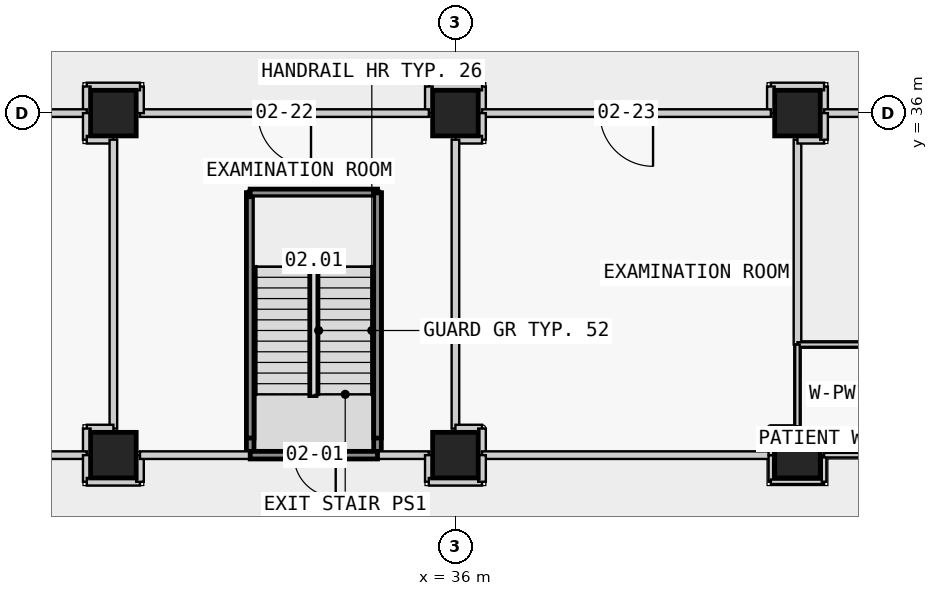
"""IFC4 building model, lengths in metres.
Left out: names, types, materials, properties, quantities, classifications, styles, units other than length and angle.
Written with IfcOpenShell. Run it as: python <this file> out.ifc"""

import sys

from ifc_helpers import new_model, si_unit, direction, frame, frame_2d, origin, origin_2d, place, context, subcontext, project, spatial, rectangle, extrude, element, fill, save


model = new_model("IFC4")
c1 = context("Model", 3, precision=1e-05, world=origin(), true_north=direction((0.0, 1.0)))
c2 = subcontext(c1, "Body", "Model", "MODEL_VIEW")
j1 = project(units=[si_unit("LENGTHUNIT", "METRE"), si_unit("PLANEANGLEUNIT", "RADIAN")], contexts=[c1])
p1 = place(None, origin())
s1 = spatial("IfcSite", under=j1, at=p1, CompositionType="ELEMENT")
p2 = place(p1, origin())
s2 = spatial("IfcBuilding", under=s1, at=p2, CompositionType="ELEMENT")
p3 = place(p2, frame((0.0, 0.0, 12.8)))
s3 = spatial("IfcBuildingStorey", under=s2, at=p3, CompositionType="ELEMENT", Elevation=12.8)
for number, where, z_axis, x_axis in (
    (1, (27.0, 27.0, 0.0), (0.0, 0.0, 1.0), (1.0, 0.0, 0.0)),
    (2, (27.0, 36.0, 0.0), (0.0, 0.0, 1.0), (1.0, 0.0, 0.0)),
    (3, (36.0, 27.0, 0.0), (0.0, 0.0, 1.0), (1.0, 0.0, 0.0)),
    (4, (36.0, 36.0, 0.0), (0.0, 0.0, 1.0), (1.0, 0.0, 0.0)),
    (5, (45.0, 27.0, 0.0), (0.0, 0.0, 1.0), (1.0, 0.0, 0.0)),
    (6, (45.0, 36.0, 0.0), (0.0, 0.0, 1.0), (1.0, 0.0, 0.0)),
):
    element("IfcColumn", number, at=place(p3, frame(where, z_axis=z_axis, x_axis=x_axis)), inside=s3, PredefinedType="COLUMN", context=c2, shape_type="SweptSolid", body=[
        extrude(rectangle(XDim=1.2, YDim=1.2, at=origin_2d()), origin(), (0.0, 0.0, 1.0), 4.5),
    ])
p4 = place(p3, frame((30.6, 27.0, 0.0), z_axis=(0.0, 0.0, 1.0), x_axis=(0.0, 1.0, 0.0)))
e7 = element("IfcWall", 7, at=p4, inside=s3, PredefinedType="PARTITIONING", context=c2, shape_type="SweptSolid", body=[
    extrude(rectangle(XDim=6.9, YDim=0.2, at=frame_2d((3.45, 0.0))), origin(), (0.0, 0.0, 1.0), 3.45),
])
p5 = place(p3, frame((30.6, 33.9, 0.0), z_axis=(0.0, 0.0, 1.0), x_axis=(1.0, 0.0, 0.0)))
e8 = element("IfcWall", 8, at=p5, inside=s3, PredefinedType="PARTITIONING", context=c2, shape_type="SweptSolid", body=[
    extrude(rectangle(XDim=3.35, YDim=0.2, at=frame_2d((1.675, 0.0))), origin(), (0.0, 0.0, 1.0), 4.15),
])
p6 = place(p3, frame((33.95, 33.9, 0.0), z_axis=(0.0, 0.0, 1.0), x_axis=(0.0, -1.0, 0.0)))
e9 = element("IfcWall", 9, at=p6, inside=s3, PredefinedType="PARTITIONING", context=c2, shape_type="SweptSolid", body=[
    extrude(rectangle(XDim=6.9, YDim=0.2, at=frame_2d((3.45, 0.0))), origin(), (0.0, 0.0, 1.0), 3.45),
])
p7 = place(p3, frame((36.7, 36.0, 0.0), z_axis=(0.0, 0.0, 1.0), x_axis=(0.0, 1.0, 0.0)))
e10 = element("IfcWall", 10, at=p7, inside=s3, PredefinedType="PARTITIONING", context=c2, shape_type="SweptSolid", body=[
    extrude(rectangle(XDim=0.7, YDim=0.2, at=frame_2d((0.35, 0.0))), origin(), (0.0, 0.0, 1.0), 3.45),
])
p8 = place(p3, frame((36.7, 36.7, 0.0), z_axis=(0.0, 0.0, 1.0), x_axis=(-1.0, 0.0, 0.0)))
e11 = element("IfcWall", 11, at=p8, inside=s3, PredefinedType="PARTITIONING", context=c2, shape_type="SweptSolid", body=[
    extrude(rectangle(XDim=1.4, YDim=0.2, at=frame_2d((0.7, 0.0))), origin(), (0.0, 0.0, 1.0), 3.45),
])
p9 = place(p3, frame((35.3, 36.7, 0.0), z_axis=(0.0, 0.0, 1.0), x_axis=(0.0, -1.0, 0.0)))
e12 = element("IfcWall", 12, at=p9, inside=s3, PredefinedType="PARTITIONING", context=c2, shape_type="SweptSolid", body=[
    extrude(rectangle(XDim=0.7, YDim=0.2, at=frame_2d((0.35, 0.0))), origin(), (0.0, 0.0, 1.0), 3.45),
])
p10 = place(p3, frame((35.3, 36.0, 0.0), z_axis=(0.0, 0.0, 1.0), x_axis=(-1.0, 0.0, 0.0)))
e13 = element("IfcWall", 13, at=p10, inside=s3, PredefinedType="PARTITIONING", context=c2, shape_type="SweptSolid", body=[
    extrude(rectangle(XDim=7.6, YDim=0.2, at=frame_2d((3.8, 0.0))), origin(), (0.0, 0.0, 1.0), 3.45),
])
p11 = place(p10, frame((3.1, 0.0, 0.0)))
e14 = element("IfcOpeningElement", 14, at=p11, cuts=e13, PredefinedType="OPENING", context=c2, shape_type="SweptSolid", body=[
    extrude(rectangle(XDim=1.4, YDim=2.1, at=frame_2d((0.7, 1.05))), frame((0.0, 0.11, 0.0), z_axis=(0.0, -1.0, 0.0), x_axis=(1.0, 0.0, 0.0)), (0.0, 0.0, 1.0), 0.22),
])
p12 = place(p3, frame((27.7, 36.0, 0.0), z_axis=(0.0, 0.0, 1.0), x_axis=(0.0, 1.0, 0.0)))
e15 = element("IfcWall", 15, at=p12, inside=s3, PredefinedType="PARTITIONING", context=c2, shape_type="SweptSolid", body=[
    extrude(rectangle(XDim=0.7, YDim=0.2, at=frame_2d((0.35, 0.0))), origin(), (0.0, 0.0, 1.0), 3.45),
])
p13 = place(p3, frame((27.7, 36.7, 0.0), z_axis=(0.0, 0.0, 1.0), x_axis=(-1.0, 0.0, 0.0)))
e16 = element("IfcWall", 16, at=p13, inside=s3, PredefinedType="PARTITIONING", context=c2, shape_type="SweptSolid", body=[
    extrude(rectangle(XDim=1.4, YDim=0.2, at=frame_2d((0.7, 0.0))), origin(), (0.0, 0.0, 1.0), 3.45),
])
p14 = place(p3, frame((26.3, 36.7, 0.0), z_axis=(0.0, 0.0, 1.0), x_axis=(0.0, -1.0, 0.0)))
e17 = element("IfcWall", 17, at=p14, inside=s3, PredefinedType="PARTITIONING", context=c2, shape_type="SweptSolid", body=[
    extrude(rectangle(XDim=0.7, YDim=0.2, at=frame_2d((0.35, 0.0))), origin(), (0.0, 0.0, 1.0), 3.45),
])
p15 = place(p3, frame((26.3, 36.0, 0.0), z_axis=(0.0, 0.0, 1.0), x_axis=(-1.0, 0.0, 0.0)))
e18 = element("IfcWall", 18, at=p15, inside=s3, PredefinedType="PARTITIONING", context=c2, shape_type="SweptSolid", body=[
    extrude(rectangle(XDim=7.3, YDim=0.2, at=frame_2d((3.65, 0.0))), origin(), (0.0, 0.0, 1.0), 3.45),
])
p16 = place(p15, frame((2.85, 0.0, 0.0)))
e19 = element("IfcOpeningElement", 19, at=p16, cuts=e18, PredefinedType="OPENING", context=c2, shape_type="SweptSolid", body=[
    extrude(rectangle(XDim=1.4, YDim=2.1, at=frame_2d((0.7, 1.05))), frame((0.0, 0.11, 0.0), z_axis=(0.0, -1.0, 0.0), x_axis=(1.0, 0.0, 0.0)), (0.0, 0.0, 1.0), 0.22),
])
p17 = place(p3, frame((45.7, 36.0, 0.0), z_axis=(0.0, 0.0, 1.0), x_axis=(0.0, 1.0, 0.0)))
e20 = element("IfcWall", 20, at=p17, inside=s3, PredefinedType="PARTITIONING", context=c2, shape_type="SweptSolid", body=[
    extrude(rectangle(XDim=0.7, YDim=0.2, at=frame_2d((0.35, 0.0))), origin(), (0.0, 0.0, 1.0), 3.45),
])
p18 = place(p3, frame((45.7, 36.7, 0.0), z_axis=(0.0, 0.0, 1.0), x_axis=(-1.0, 0.0, 0.0)))
e21 = element("IfcWall", 21, at=p18, inside=s3, PredefinedType="PARTITIONING", context=c2, shape_type="SweptSolid", body=[
    extrude(rectangle(XDim=1.4, YDim=0.2, at=frame_2d((0.7, 0.0))), origin(), (0.0, 0.0, 1.0), 3.45),
])
p19 = place(p3, frame((44.3, 36.7, 0.0), z_axis=(0.0, 0.0, 1.0), x_axis=(0.0, -1.0, 0.0)))
e22 = element("IfcWall", 22, at=p19, inside=s3, PredefinedType="PARTITIONING", context=c2, shape_type="SweptSolid", body=[
    extrude(rectangle(XDim=0.7, YDim=0.2, at=frame_2d((0.35, 0.0))), origin(), (0.0, 0.0, 1.0), 3.45),
])
p20 = place(p3, frame((44.3, 36.0, 0.0), z_axis=(0.0, 0.0, 1.0), x_axis=(-1.0, 0.0, 0.0)))
e23 = element("IfcWall", 23, at=p20, inside=s3, PredefinedType="PARTITIONING", context=c2, shape_type="SweptSolid", body=[
    extrude(rectangle(XDim=7.6, YDim=0.2, at=frame_2d((3.8, 0.0))), origin(), (0.0, 0.0, 1.0), 3.45),
])
p21 = place(p20, frame((3.1, 0.0, 0.0)))
e24 = element("IfcOpeningElement", 24, at=p21, cuts=e23, PredefinedType="OPENING", context=c2, shape_type="SweptSolid", body=[
    extrude(rectangle(XDim=1.4, YDim=2.1, at=frame_2d((0.7, 1.05))), frame((0.0, 0.11, 0.0), z_axis=(0.0, -1.0, 0.0), x_axis=(1.0, 0.0, 0.0)), (0.0, 0.0, 1.0), 0.22),
])
for number, where, z_axis, x_axis in (
    (25, (26.3, 36.0, 0.0), (0.0, 0.0, 1.0), (0.0, -1.0, 0.0)),
    (26, (26.3, 35.3, 0.0), (0.0, 0.0, 1.0), (1.0, 0.0, 0.0)),
):
    element("IfcWall", number, at=place(p3, frame(where, z_axis=z_axis, x_axis=x_axis)), inside=s3, PredefinedType="PARTITIONING", context=c2, shape_type="SweptSolid", body=[
        extrude(rectangle(XDim=0.7, YDim=0.2, at=frame_2d((0.35, 0.0))), origin(), (0.0, 0.0, 1.0), 3.45),
    ])
p22 = place(p3, frame((27.0, 35.3, 0.0), z_axis=(0.0, 0.0, 1.0), x_axis=(0.0, -1.0, 0.0)))
e27 = element("IfcWall", 27, at=p22, inside=s3, PredefinedType="PARTITIONING", context=c2, shape_type="SweptSolid", body=[
    extrude(rectangle(XDim=7.6, YDim=0.2, at=frame_2d((3.8, 0.0))), origin(), (0.0, 0.0, 1.0), 3.45),
])
for number, where, z_axis, x_axis in (
    (28, (27.0, 27.7, 0.0), (0.0, 0.0, 1.0), (-1.0, 0.0, 0.0)),
    (29, (26.3, 27.7, 0.0), (0.0, 0.0, 1.0), (0.0, -1.0, 0.0)),
    (30, (36.7, 36.0, 0.0), (0.0, 0.0, 1.0), (0.0, -1.0, 0.0)),
    (31, (36.7, 35.3, 0.0), (0.0, 0.0, 1.0), (-1.0, 0.0, 0.0)),
):
    element("IfcWall", number, at=place(p3, frame(where, z_axis=z_axis, x_axis=x_axis)), inside=s3, PredefinedType="PARTITIONING", context=c2, shape_type="SweptSolid", body=[
        extrude(rectangle(XDim=0.7, YDim=0.2, at=frame_2d((0.35, 0.0))), origin(), (0.0, 0.0, 1.0), 3.45),
    ])
p23 = place(p3, frame((36.0, 35.3, 0.0), z_axis=(0.0, 0.0, 1.0), x_axis=(0.0, -1.0, 0.0)))
e32 = element("IfcWall", 32, at=p23, inside=s3, PredefinedType="PARTITIONING", context=c2, shape_type="SweptSolid", body=[
    extrude(rectangle(XDim=7.6, YDim=0.2, at=frame_2d((3.8, 0.0))), origin(), (0.0, 0.0, 1.0), 3.45),
])
for number, where, z_axis, x_axis in (
    (33, (36.0, 27.7, 0.0), (0.0, 0.0, 1.0), (1.0, 0.0, 0.0)),
    (34, (36.7, 27.7, 0.0), (0.0, 0.0, 1.0), (0.0, -1.0, 0.0)),
):
    element("IfcWall", number, at=place(p3, frame(where, z_axis=z_axis, x_axis=x_axis)), inside=s3, PredefinedType="PARTITIONING", context=c2, shape_type="SweptSolid", body=[
        extrude(rectangle(XDim=0.7, YDim=0.2, at=frame_2d((0.35, 0.0))), origin(), (0.0, 0.0, 1.0), 3.45),
    ])
p24 = place(p3, frame((53.3, 36.0, 0.0), z_axis=(0.0, 0.0, 1.0), x_axis=(-1.0, 0.0, 0.0)))
e35 = element("IfcWall", 35, at=p24, inside=s3, PredefinedType="PARTITIONING", context=c2, shape_type="SweptSolid", body=[
    extrude(rectangle(XDim=7.6, YDim=0.2, at=frame_2d((3.8, 0.0))), origin(), (0.0, 0.0, 1.0), 3.45),
])
p25 = place(p24, frame((2.85, 0.0, 0.0)))
e36 = element("IfcOpeningElement", 36, at=p25, cuts=e35, PredefinedType="OPENING", context=c2, shape_type="SweptSolid", body=[
    extrude(rectangle(XDim=1.8, YDim=2.1, at=frame_2d((0.9, 1.05))), frame((0.0, 0.11, 0.0), z_axis=(0.0, -1.0, 0.0), x_axis=(1.0, 0.0, 0.0)), (0.0, 0.0, 1.0), 0.22),
])
p26 = place(p3, frame((18.8, 27.0, 0.0), z_axis=(0.0, 0.0, 1.0), x_axis=(1.0, 0.0, 0.0)))
e37 = element("IfcWall", 37, at=p26, inside=s3, PredefinedType="PARTITIONING", context=c2, shape_type="SweptSolid", body=[
    extrude(rectangle(XDim=7.5, YDim=0.2, at=frame_2d((3.75, 0.0))), origin(), (0.0, 0.0, 1.0), 3.45),
])
p27 = place(p3, frame((36.7, 27.0, 0.0), z_axis=(0.0, 0.0, 1.0), x_axis=(1.0, 0.0, 0.0)))
e38 = element("IfcWall", 38, at=p27, inside=s3, PredefinedType="PARTITIONING", context=c2, shape_type="SweptSolid", body=[
    extrude(rectangle(XDim=7.6, YDim=0.2, at=frame_2d((3.8, 0.0))), origin(), (0.0, 0.0, 1.0), 3.45),
])
p28 = place(p3, frame((45.0, 29.911, 0.0), z_axis=(0.0, 0.0, 1.0), x_axis=(0.0, 1.0, 0.0)))
e39 = element("IfcWall", 39, at=p28, inside=s3, PredefinedType="PARTITIONING", context=c2, shape_type="SweptSolid", body=[
    extrude(rectangle(XDim=5.389, YDim=0.2, at=frame_2d((2.695, 0.0))), origin(), (0.0, 0.0, 1.0), 3.45),
])
for number, where, z_axis, x_axis in (
    (40, (45.0, 35.3, 0.0), (0.0, 0.0, 1.0), (1.0, 0.0, 0.0)),
    (41, (45.7, 35.3, 0.0), (0.0, 0.0, 1.0), (0.0, 1.0, 0.0)),
):
    element("IfcWall", number, at=place(p3, frame(where, z_axis=z_axis, x_axis=x_axis)), inside=s3, PredefinedType="PARTITIONING", context=c2, shape_type="SweptSolid", body=[
        extrude(rectangle(XDim=0.7, YDim=0.2, at=frame_2d((0.35, 0.0))), origin(), (0.0, 0.0, 1.0), 3.45),
    ])
p29 = place(p3, frame((44.3, 27.0, 0.0), z_axis=(0.0, 0.0, 1.0), x_axis=(0.0, -1.0, 0.0)))
e42 = element("IfcWall", 42, at=p29, inside=s3, PredefinedType="PARTITIONING", context=c2, shape_type="SweptSolid", body=[
    extrude(rectangle(XDim=0.7, YDim=0.12, at=frame_2d((0.35, 0.0))), origin(), (0.0, 0.0, 1.0), 3.45),
])
p30 = place(p3, frame((44.3, 26.3, 0.0), z_axis=(0.0, 0.0, 1.0), x_axis=(1.0, 0.0, 0.0)))
e43 = element("IfcWall", 43, at=p30, inside=s3, PredefinedType="PARTITIONING", context=c2, shape_type="SweptSolid", body=[
    extrude(rectangle(XDim=1.4, YDim=0.12, at=frame_2d((0.7, 0.0))), origin(), (0.0, 0.0, 1.0), 3.45),
])
p31 = place(p3, frame((45.7, 26.3, 0.0), z_axis=(0.0, 0.0, 1.0), x_axis=(0.0, 1.0, 0.0)))
e44 = element("IfcWall", 44, at=p31, inside=s3, PredefinedType="PARTITIONING", context=c2, shape_type="SweptSolid", body=[
    extrude(rectangle(XDim=0.7, YDim=0.12, at=frame_2d((0.35, 0.0))), origin(), (0.0, 0.0, 1.0), 3.45),
])
p32 = place(p3, frame((45.7, 27.0, 0.0), z_axis=(0.0, 0.0, 1.0), x_axis=(1.0, 0.0, 0.0)))
e45 = element("IfcWall", 45, at=p32, inside=s3, PredefinedType="PARTITIONING", context=c2, shape_type="SweptSolid", body=[
    extrude(rectangle(XDim=3.8, YDim=0.12, at=frame_2d((1.9, 0.0))), origin(), (0.0, 0.0, 1.0), 3.45),
])
p33 = place(p3, frame((26.3, 27.0, 0.0), z_axis=(0.0, 0.0, 1.0), x_axis=(0.0, -1.0, 0.0)))
e46 = element("IfcWall", 46, at=p33, inside=s3, PredefinedType="PARTITIONING", context=c2, shape_type="SweptSolid", body=[
    extrude(rectangle(XDim=0.7, YDim=0.2, at=frame_2d((0.35, 0.0))), origin(), (0.0, 0.0, 1.0), 3.45),
])
p34 = place(p3, frame((26.3, 26.3, 0.0), z_axis=(0.0, 0.0, 1.0), x_axis=(1.0, 0.0, 0.0)))
e47 = element("IfcWall", 47, at=p34, inside=s3, PredefinedType="PARTITIONING", context=c2, shape_type="SweptSolid", body=[
    extrude(rectangle(XDim=1.4, YDim=0.2, at=frame_2d((0.7, 0.0))), origin(), (0.0, 0.0, 1.0), 3.45),
])
p35 = place(p3, frame((27.7, 26.3, 0.0), z_axis=(0.0, 0.0, 1.0), x_axis=(0.0, 1.0, 0.0)))
e48 = element("IfcWall", 48, at=p35, inside=s3, PredefinedType="PARTITIONING", context=c2, shape_type="SweptSolid", body=[
    extrude(rectangle(XDim=0.7, YDim=0.2, at=frame_2d((0.35, 0.0))), origin(), (0.0, 0.0, 1.0), 3.45),
])
p36 = place(p3, frame((27.7, 27.0, 0.0), z_axis=(0.0, 0.0, 1.0), x_axis=(1.0, 0.0, 0.0)))
e49 = element("IfcWall", 49, at=p36, inside=s3, PredefinedType="PARTITIONING", context=c2, shape_type="SweptSolid", body=[
    extrude(rectangle(XDim=2.9, YDim=0.2, at=frame_2d((1.45, 0.0))), origin(), (0.0, 0.0, 1.0), 3.45),
])
p37 = place(p3, frame((49.5, 29.911, 0.0), z_axis=(0.0, 0.0, 1.0), x_axis=(-1.0, 0.0, 0.0)))
e50 = element("IfcWall", 50, at=p37, inside=s3, PredefinedType="PARTITIONING", context=c2, shape_type="SweptSolid", body=[
    extrude(rectangle(XDim=4.5, YDim=0.12, at=frame_2d((2.25, 0.0))), origin(), (0.0, 0.0, 1.0), 3.45),
])
p38 = place(p3, frame((33.95, 27.0, 0.0), z_axis=(0.0, 0.0, 1.0), x_axis=(1.0, 0.0, 0.0)))
e51 = element("IfcWall", 51, at=p38, inside=s3, PredefinedType="PARTITIONING", context=c2, shape_type="SweptSolid", body=[
    extrude(rectangle(XDim=1.35, YDim=0.2, at=frame_2d((0.675, 0.0))), origin(), (0.0, 0.0, 1.0), 3.45),
])
p39 = place(p3, frame((35.3, 27.0, 0.0), z_axis=(0.0, 0.0, 1.0), x_axis=(0.0, -1.0, 0.0)))
e52 = element("IfcWall", 52, at=p39, inside=s3, PredefinedType="PARTITIONING", context=c2, shape_type="SweptSolid", body=[
    extrude(rectangle(XDim=0.7, YDim=0.2, at=frame_2d((0.35, 0.0))), origin(), (0.0, 0.0, 1.0), 3.45),
])
p40 = place(p3, frame((35.3, 26.3, 0.0), z_axis=(0.0, 0.0, 1.0), x_axis=(1.0, 0.0, 0.0)))
e53 = element("IfcWall", 53, at=p40, inside=s3, PredefinedType="PARTITIONING", context=c2, shape_type="SweptSolid", body=[
    extrude(rectangle(XDim=1.4, YDim=0.2, at=frame_2d((0.7, 0.0))), origin(), (0.0, 0.0, 1.0), 3.45),
])
p41 = place(p3, frame((36.7, 26.3, 0.0), z_axis=(0.0, 0.0, 1.0), x_axis=(0.0, 1.0, 0.0)))
e54 = element("IfcWall", 54, at=p41, inside=s3, PredefinedType="PARTITIONING", context=c2, shape_type="SweptSolid", body=[
    extrude(rectangle(XDim=0.7, YDim=0.2, at=frame_2d((0.35, 0.0))), origin(), (0.0, 0.0, 1.0), 3.45),
])
p42 = place(p3, frame((45.0, 29.911, 0.0), z_axis=(0.0, 0.0, 1.0), x_axis=(0.0, -1.0, 0.0)))
e55 = element("IfcWall", 55, at=p42, inside=s3, PredefinedType="PARTITIONING", context=c2, shape_type="SweptSolid", body=[
    extrude(rectangle(XDim=2.211, YDim=0.12, at=frame_2d((1.105, 0.0))), origin(), (0.0, 0.0, 1.0), 3.45),
])
for number, where, z_axis, x_axis in (
    (56, (45.0, 27.7, 0.0), (0.0, 0.0, 1.0), (-1.0, 0.0, 0.0)),
    (57, (44.3, 27.7, 0.0), (0.0, 0.0, 1.0), (0.0, -1.0, 0.0)),
):
    element("IfcWall", number, at=place(p3, frame(where, z_axis=z_axis, x_axis=x_axis)), inside=s3, PredefinedType="PARTITIONING", context=c2, shape_type="SweptSolid", body=[
        extrude(rectangle(XDim=0.7, YDim=0.12, at=frame_2d((0.35, 0.0))), origin(), (0.0, 0.0, 1.0), 3.45),
    ])
p43 = place(p3, frame((33.95, 27.0, 0.0), z_axis=(0.0, 0.0, 1.0), x_axis=(-1.0, 0.0, 0.0)))
e58 = element("IfcWall", 58, at=p43, inside=s3, PredefinedType="PARTITIONING", context=c2, shape_type="SweptSolid", body=[
    extrude(rectangle(XDim=3.35, YDim=0.2, at=frame_2d((1.675, 0.0))), origin(), (0.0, 0.0, 1.0), 3.45),
])
p44 = place(p43, frame((1.1, 0.0, 0.0)))
e59 = element("IfcOpeningElement", 59, at=p44, cuts=e58, PredefinedType="OPENING", context=c2, shape_type="SweptSolid", body=[
    extrude(rectangle(XDim=1.1, YDim=2.1, at=frame_2d((0.55, 1.05))), frame((0.0, 0.11, 0.0), z_axis=(0.0, -1.0, 0.0), x_axis=(1.0, 0.0, 0.0)), (0.0, 0.0, 1.0), 0.22),
])
for number, where, z_axis, x_axis in (
    (60, (30.6, 27.45, 3.45), (0.0, 0.0, 1.0), (0.0, 1.0, 0.0)),
    (61, (33.95, 33.9, 3.45), (0.0, 0.0, 1.0), (0.0, -1.0, 0.0)),
):
    element("IfcWall", number, at=place(p3, frame(where, z_axis=z_axis, x_axis=x_axis)), inside=s3, PredefinedType="PARTITIONING", context=c2, shape_type="SweptSolid", body=[
        extrude(rectangle(XDim=6.45, YDim=0.2, at=frame_2d((3.225, 0.0))), origin(), (0.0, 0.0, 1.0), 0.7),
    ])
p45 = place(p44, origin())
e62 = element("IfcDoor", 62, at=p45, inside=s3, OperationType="SINGLE_SWING_LEFT", PredefinedType="DOOR", context=c2, shape_type="SweptSolid", body=[
    extrude(rectangle(XDim=1.1, YDim=2.1, at=frame_2d((0.55, 1.05))), frame((0.0, 0.025, 0.0), z_axis=(0.0, -1.0, 0.0), x_axis=(1.0, 0.0, 0.0)), (0.0, 0.0, 1.0), 0.05),
])
fill(e59, e62)
p46 = place(p11, origin())
e63 = element("IfcDoor", 63, at=p46, inside=s3, OperationType="SINGLE_SWING_LEFT", PredefinedType="DOOR", context=c2, shape_type="SweptSolid", body=[
    extrude(rectangle(XDim=1.4, YDim=2.1, at=frame_2d((0.7, 1.05))), frame((0.0, 0.025, 0.0), z_axis=(0.0, -1.0, 0.0), x_axis=(1.0, 0.0, 0.0)), (0.0, 0.0, 1.0), 0.05),
])
fill(e14, e63)
p47 = place(p21, origin())
e64 = element("IfcDoor", 64, at=p47, inside=s3, OperationType="SINGLE_SWING_LEFT", PredefinedType="DOOR", context=c2, shape_type="SweptSolid", body=[
    extrude(rectangle(XDim=1.4, YDim=2.1, at=frame_2d((0.7, 1.05))), frame((0.0, 0.025, 0.0), z_axis=(0.0, -1.0, 0.0), x_axis=(1.0, 0.0, 0.0)), (0.0, 0.0, 1.0), 0.05),
])
fill(e24, e64)
save(model, sys.argv[1])
